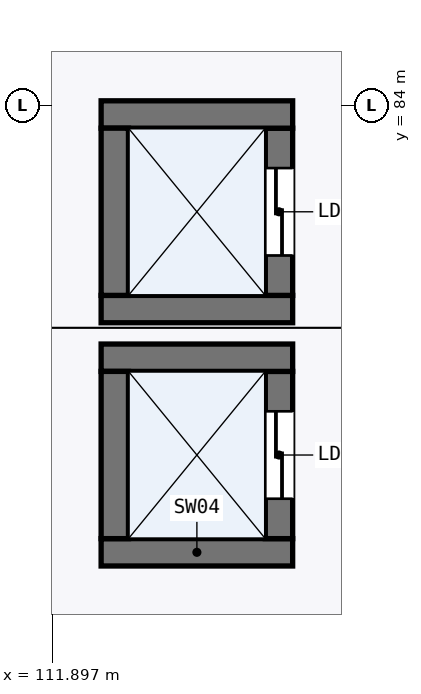
"""IFC4 building model, lengths in metres.
Left out: names, types, materials, properties, quantities, classifications, styles, units other than length and angle.
Written with IfcOpenShell. Run it as: python <this file> out.ifc"""

import sys

from ifc_helpers import new_model, si_unit, direction, frame, frame_2d, origin, place, context, subcontext, project, spatial, rectangle, extrude, element, fill, save


model = new_model("IFC4")
c1 = context("Model", 3, precision=1e-05, world=origin(), true_north=direction((0.0, 1.0)))
c2 = subcontext(c1, "Body", "Model", "MODEL_VIEW")
j1 = project(units=[si_unit("LENGTHUNIT", "METRE"), si_unit("PLANEANGLEUNIT", "RADIAN")], contexts=[c1])
p1 = place(None, origin())
s1 = spatial("IfcSite", under=j1, at=p1, CompositionType="ELEMENT")
p2 = place(p1, origin())
s2 = spatial("IfcBuilding", under=s1, at=p2, CompositionType="ELEMENT")
p3 = place(p2, frame((0.0, 0.0, 11.4)))
s3 = spatial("IfcBuildingStorey", under=s2, at=p3, CompositionType="ELEMENT", Elevation=11.4)
p4 = place(p3, frame((112.54, 78.12, 0.0), z_axis=(0.0, 0.0, 1.0), x_axis=(1.0, 0.0, 0.0)))
e1 = element("IfcWall", 1, at=p4, inside=s3, PredefinedType="SHEAR", context=c2, shape_type="SweptSolid", body=[
    extrude(rectangle(XDim=2.52, YDim=0.36, at=frame_2d((1.26, 0.0))), origin(), (0.0, 0.0, 1.0), 4.845),
])
p5 = place(p3, frame((114.88, 78.3, 0.0), z_axis=(0.0, 0.0, 1.0), x_axis=(0.0, 1.0, 0.0)))
e2 = element("IfcWall", 2, at=p5, inside=s3, PredefinedType="SHEAR", context=c2, shape_type="SweptSolid", body=[
    extrude(rectangle(XDim=2.2, YDim=0.36, at=frame_2d((1.1, 0.0))), origin(), (0.0, 0.0, 1.0), 4.845),
])
p6 = place(p5, frame((0.525, 0.0, 0.0)))
e3 = element("IfcOpeningElement", 3, at=p6, cuts=e2, PredefinedType="OPENING", context=c2, shape_type="SweptSolid", body=[
    extrude(rectangle(XDim=1.15, YDim=2.2, at=frame_2d((0.575, 1.1))), frame((0.0, 0.19, 0.0), z_axis=(0.0, -1.0, 0.0), x_axis=(1.0, 0.0, 0.0)), (0.0, 0.0, 1.0), 0.38),
])
p7 = place(p3, frame((115.06, 80.68, 0.0), z_axis=(0.0, 0.0, 1.0), x_axis=(-1.0, 0.0, 0.0)))
e4 = element("IfcWall", 4, at=p7, inside=s3, PredefinedType="SHEAR", context=c2, shape_type="SweptSolid", body=[
    extrude(rectangle(XDim=2.52, YDim=0.36, at=frame_2d((1.26, 0.0))), origin(), (0.0, 0.0, 1.0), 4.845),
])
p8 = place(p3, frame((112.72, 80.5, 0.0), z_axis=(0.0, 0.0, 1.0), x_axis=(0.0, -1.0, 0.0)))
e5 = element("IfcWall", 5, at=p8, inside=s3, PredefinedType="SHEAR", context=c2, shape_type="SweptSolid", body=[
    extrude(rectangle(XDim=2.2, YDim=0.36, at=frame_2d((1.1, 0.0))), origin(), (0.0, 0.0, 1.0), 4.845),
])
p9 = place(p3, frame((112.54, 81.32, 0.0), z_axis=(0.0, 0.0, 1.0), x_axis=(1.0, 0.0, 0.0)))
e6 = element("IfcWall", 6, at=p9, inside=s3, PredefinedType="SHEAR", context=c2, shape_type="SweptSolid", body=[
    extrude(rectangle(XDim=2.52, YDim=0.36, at=frame_2d((1.26, 0.0))), origin(), (0.0, 0.0, 1.0), 4.845),
])
p10 = place(p3, frame((114.88, 81.5, 0.0), z_axis=(0.0, 0.0, 1.0), x_axis=(0.0, 1.0, 0.0)))
e7 = element("IfcWall", 7, at=p10, inside=s3, PredefinedType="SHEAR", context=c2, shape_type="SweptSolid", body=[
    extrude(rectangle(XDim=2.2, YDim=0.36, at=frame_2d((1.1, 0.0))), origin(), (0.0, 0.0, 1.0), 4.845),
])
p11 = place(p10, frame((0.525, 0.0, 0.0)))
e8 = element("IfcOpeningElement", 8, at=p11, cuts=e7, PredefinedType="OPENING", context=c2, shape_type="SweptSolid", body=[
    extrude(rectangle(XDim=1.15, YDim=2.2, at=frame_2d((0.575, 1.1))), frame((0.0, 0.19, 0.0), z_axis=(0.0, -1.0, 0.0), x_axis=(1.0, 0.0, 0.0)), (0.0, 0.0, 1.0), 0.38),
])
p12 = place(p3, frame((115.06, 83.88, 0.0), z_axis=(0.0, 0.0, 1.0), x_axis=(-1.0, 0.0, 0.0)))
e9 = element("IfcWall", 9, at=p12, inside=s3, PredefinedType="SHEAR", context=c2, shape_type="SweptSolid", body=[
    extrude(rectangle(XDim=2.52, YDim=0.36, at=frame_2d((1.26, 0.0))), origin(), (0.0, 0.0, 1.0), 4.845),
])
p13 = place(p3, frame((112.72, 83.7, 0.0), z_axis=(0.0, 0.0, 1.0), x_axis=(0.0, -1.0, 0.0)))
e10 = element("IfcWall", 10, at=p13, inside=s3, PredefinedType="SHEAR", context=c2, shape_type="SweptSolid", body=[
    extrude(rectangle(XDim=2.2, YDim=0.36, at=frame_2d((1.1, 0.0))), origin(), (0.0, 0.0, 1.0), 4.845),
])
p14 = place(p6, frame((1.15, 0.0, 0.0), z_axis=(0.0, 0.0, 1.0), x_axis=(-1.0, 0.0, 0.0)))
e11 = element("IfcDoor", 11, at=p14, inside=s3, OperationType="DOUBLE_DOOR_SLIDING", PredefinedType="DOOR", context=c2, shape_type="SweptSolid", body=[
    extrude(rectangle(XDim=1.15, YDim=2.2, at=frame_2d((0.575, 1.1))), frame((0.0, 0.025, 0.0), z_axis=(0.0, -1.0, 0.0), x_axis=(1.0, 0.0, 0.0)), (0.0, 0.0, 1.0), 0.05),
])
fill(e3, e11)
p15 = place(p11, frame((1.15, 0.0, 0.0), z_axis=(0.0, 0.0, 1.0), x_axis=(-1.0, 0.0, 0.0)))
e12 = element("IfcDoor", 12, at=p15, inside=s3, OperationType="DOUBLE_DOOR_SLIDING", PredefinedType="DOOR", context=c2, shape_type="SweptSolid", body=[
    extrude(rectangle(XDim=1.15, YDim=2.2, at=frame_2d((0.575, 1.1))), frame((0.0, 0.025, 0.0), z_axis=(0.0, -1.0, 0.0), x_axis=(1.0, 0.0, 0.0)), (0.0, 0.0, 1.0), 0.05),
])
fill(e8, e12)
save(model, sys.argv[1])
